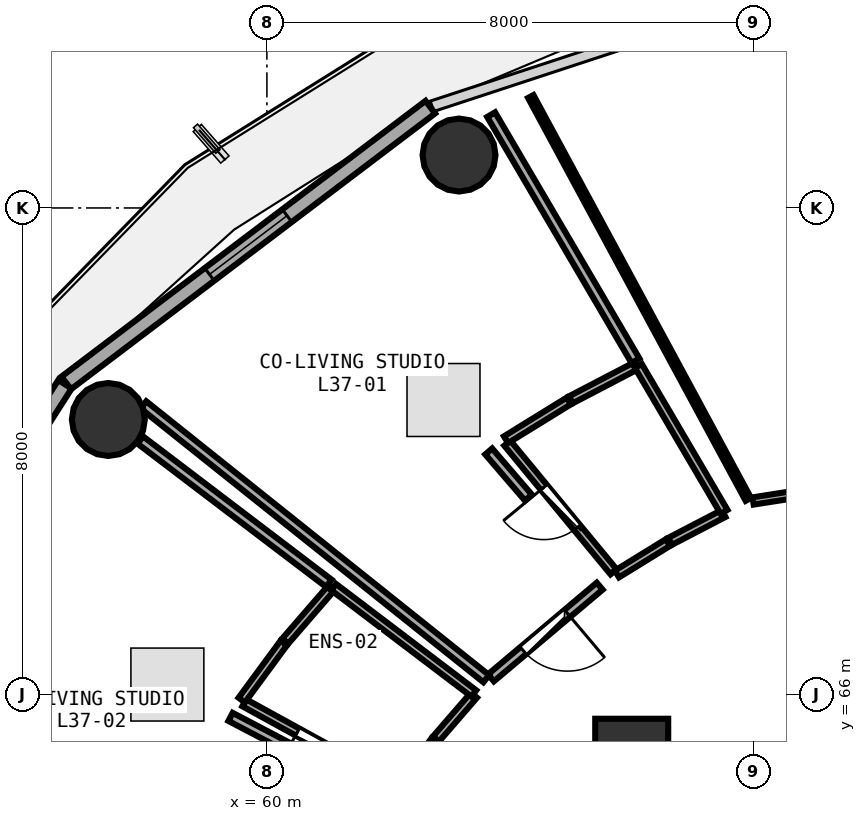
"""IFC4 building model, lengths in metres.
Left out: names, types, materials, properties, quantities, classifications, styles, units other than length and angle.
Written with IfcOpenShell. Run it as: python <this file> out.ifc"""

import sys

from ifc_helpers import new_model, si_unit, direction, frame, frame_2d, origin, origin_2d, place, context, subcontext, project, spatial, rectangle, circle, extrude, element, fill, save


model = new_model("IFC4")
c1 = context("Model", 3, precision=1e-05, world=origin(), true_north=direction((0.0, 1.0)))
c2 = subcontext(c1, "Body", "Model", "MODEL_VIEW")
j1 = project(units=[si_unit("LENGTHUNIT", "METRE"), si_unit("PLANEANGLEUNIT", "RADIAN")], contexts=[c1])
p1 = place(None, origin())
s1 = spatial("IfcSite", under=j1, at=p1, CompositionType="ELEMENT")
p2 = place(p1, origin())
s2 = spatial("IfcBuilding", under=s1, at=p2, CompositionType="ELEMENT")
p3 = place(p2, frame((0.0, 0.0, 146.85)))
s3 = spatial("IfcBuildingStorey", under=s2, at=p3, CompositionType="ELEMENT", Elevation=146.85)
p4 = place(p3, frame((66.0, 65.0, 0.0), z_axis=(0.0, 0.0, 1.0), x_axis=(1.0, 0.0, 0.0)))
e1 = element("IfcColumn", 1, at=p4, inside=s3, PredefinedType="PILASTER", context=c2, shape_type="SweptSolid", body=[
    extrude(rectangle(XDim=1.2, YDim=1.2, at=origin_2d()), origin(), (0.0, 0.0, 1.0), 3.75),
])
for number, where, z_axis, x_axis in (
    (2, (63.16, 74.87, 0.0), (0.0, 0.0, 1.0), (1.0, 0.0, 0.0)),
    (3, (57.392, 70.521, 0.0), (0.0, 0.0, 1.0), (1.0, 0.0, 0.0)),
):
    element("IfcColumn", number, at=place(p3, frame(where, z_axis=z_axis, x_axis=x_axis)), inside=s3, PredefinedType="COLUMN", context=c2, shape_type="SweptSolid", body=[
        extrude(circle(Radius=0.6, at=origin_2d()), origin(), (0.0, 0.0, 1.0), 3.75),
    ])
p5 = place(p3, frame((62.688, 75.658, 0.0), z_axis=(0.0, 0.0, 1.0), x_axis=(-0.797163719609, -0.603763202042, 0.0)))
e4 = element("IfcWall", 4, at=p5, inside=s3, PredefinedType="SOLIDWALL", context=c2, shape_type="SweptSolid", body=[
    extrude(rectangle(XDim=7.512, YDim=0.26, at=frame_2d((3.756, 0.0))), origin(), (0.0, 0.0, 1.0), 3.475),
])
p6 = place(p5, frame((2.956, 0.0, 0.85)))
e5 = element("IfcOpeningElement", 5, at=p6, cuts=e4, PredefinedType="OPENING", context=c2, shape_type="SweptSolid", body=[
    extrude(rectangle(XDim=1.6, YDim=1.45, at=frame_2d((0.8, 0.725))), frame((0.0, 0.14, 0.0), z_axis=(0.0, -1.0, 0.0), x_axis=(1.0, 0.0, 0.0)), (0.0, 0.0, 1.0), 0.28),
])
p7 = place(p3, frame((56.679, 71.1, 0.0), z_axis=(0.0, 0.0, 1.0), x_axis=(-0.538801521808, -0.842432739213, 0.0)))
e6 = element("IfcWall", 6, at=p7, inside=s3, PredefinedType="SOLIDWALL", context=c2, shape_type="SweptSolid", body=[
    extrude(rectangle(XDim=7.253, YDim=0.26, at=frame_2d((3.627, 0.0))), origin(), (0.0, 0.0, 1.0), 3.475),
])
p8 = place(p7, frame((3.152, 0.0, 0.0)))
e7 = element("IfcOpeningElement", 7, at=p8, cuts=e6, PredefinedType="OPENING", context=c2, shape_type="SweptSolid", body=[
    extrude(rectangle(XDim=0.95, YDim=2.1, at=frame_2d((0.475, 1.05))), frame((0.0, 0.14, 0.0), z_axis=(0.0, -1.0, 0.0), x_axis=(1.0, 0.0, 0.0)), (0.0, 0.0, 1.0), 0.28),
])
p9 = place(p7, frame((4.452, 0.0, 0.85)))
e8 = element("IfcOpeningElement", 8, at=p9, cuts=e6, PredefinedType="OPENING", context=c2, shape_type="SweptSolid", body=[
    extrude(rectangle(XDim=1.2, YDim=1.45, at=frame_2d((0.6, 0.725))), frame((0.0, 0.14, 0.0), z_axis=(0.0, -1.0, 0.0), x_axis=(1.0, 0.0, 0.0)), (0.0, 0.0, 1.0), 0.28),
])
p10 = place(p3, frame((75.447, 70.347, 0.0), z_axis=(0.0, 0.0, 1.0), x_axis=(-0.987988721118, -0.154526007337, 0.0)))
e9 = element("IfcWall", 9, at=p10, inside=s3, PredefinedType="PARTITIONING", context=c2, shape_type="SweptSolid", body=[
    extrude(rectangle(XDim=7.541, YDim=0.12, at=frame_2d((3.771, 0.0))), origin(), (0.0, 0.0, 1.0), 2.975),
])
p11 = place(p10, frame((3.32, 0.0, 0.0)))
e10 = element("IfcOpeningElement", 10, at=p11, cuts=e9, PredefinedType="OPENING", context=c2, shape_type="SweptSolid", body=[
    extrude(rectangle(XDim=0.9, YDim=2.08, at=frame_2d((0.45, 1.04))), frame((0.0, 0.07, 0.0), z_axis=(0.0, -1.0, 0.0), x_axis=(1.0, 0.0, 0.0)), (0.0, 0.0, 1.0), 0.14),
])
p12 = place(p3, frame((65.702, 68.016, 0.0), z_axis=(0.0, 0.0, 1.0), x_axis=(-0.636757315483, 0.771064278241, 0.0)))
e11 = element("IfcWall", 11, at=p12, inside=s3, PredefinedType="PLUMBINGWALL", context=c2, shape_type="SweptSolid", body=[
    extrude(rectangle(XDim=2.745, YDim=0.13, at=frame_2d((1.373, 0.0))), origin(), (0.0, 0.0, 1.0), 2.975),
])
p13 = place(p12, frame((0.942, 0.0, 0.0)))
e12 = element("IfcOpeningElement", 12, at=p13, cuts=e11, PredefinedType="OPENING", context=c2, shape_type="SweptSolid", body=[
    extrude(rectangle(XDim=0.86, YDim=2.05, at=frame_2d((0.43, 1.025))), frame((0.0, 0.075, 0.0), z_axis=(0.0, -1.0, 0.0), x_axis=(1.0, 0.0, 0.0)), (0.0, 0.0, 1.0), 0.15),
])
p14 = place(p3, frame((65.473, 67.78, 0.0), z_axis=(0.0, 0.0, 1.0), x_axis=(-0.764572750514, -0.644537438146, 0.0)))
e13 = element("IfcWall", 13, at=p14, inside=s3, PredefinedType="PARTITIONING", context=c2, shape_type="SweptSolid", body=[
    extrude(rectangle(XDim=2.339, YDim=0.15, at=frame_2d((1.169, 0.0))), origin(), (0.0, 0.0, 1.0), 2.975),
])
p15 = place(p14, frame((0.694, 0.0, 0.0)))
e14 = element("IfcOpeningElement", 14, at=p15, cuts=e13, PredefinedType="OPENING", context=c2, shape_type="SweptSolid", body=[
    extrude(rectangle(XDim=0.95, YDim=2.08, at=frame_2d((0.475, 1.04))), frame((0.0, 0.085, 0.0), z_axis=(0.0, -1.0, 0.0), x_axis=(1.0, 0.0, 0.0)), (0.0, 0.0, 1.0), 0.17),
])
p16 = place(p3, frame((62.131, 64.489, 0.0), z_axis=(0.0, 0.0, 1.0), x_axis=(-0.87680194327, 0.480851694681, 0.0)))
e15 = element("IfcWall", 15, at=p16, inside=s3, PredefinedType="PLUMBINGWALL", context=c2, shape_type="SweptSolid", body=[
    extrude(rectangle(XDim=2.855, YDim=0.13, at=frame_2d((1.428, 0.0))), origin(), (0.0, 0.0, 1.0), 2.975),
])
p17 = place(p16, frame((0.998, 0.0, 0.0)))
e16 = element("IfcOpeningElement", 16, at=p17, cuts=e15, PredefinedType="OPENING", context=c2, shape_type="SweptSolid", body=[
    extrude(rectangle(XDim=0.86, YDim=2.05, at=frame_2d((0.43, 1.025))), frame((0.0, 0.075, 0.0), z_axis=(0.0, -1.0, 0.0), x_axis=(1.0, 0.0, 0.0)), (0.0, 0.0, 1.0), 0.15),
])
p18 = place(p3, frame((67.918, 69.207, 0.0), z_axis=(0.0, 0.0, 1.0), x_axis=(-0.475160964166, 0.879898890858, 0.0)))
e17 = element("IfcWall", 17, at=p18, inside=s3, PredefinedType="PARTITIONING", context=c2, shape_type="SweptSolid", body=[
    extrude(rectangle(XDim=7.53, YDim=0.1, at=frame_2d((3.765, 0.0))), origin(), (0.0, 0.0, 1.0), 3.025),
])
p19 = place(p3, frame((67.511, 68.976, 0.0), z_axis=(0.0, 0.0, 1.0), x_axis=(-0.88687840459, -0.462002917168, 0.0)))
e18 = element("IfcWall", 18, at=p19, inside=s3, PredefinedType="PLUMBINGWALL", context=c2, shape_type="SweptSolid", body=[
    extrude(rectangle(XDim=0.993, YDim=0.13, at=frame_2d((0.497, 0.0))), origin(), (0.0, 0.0, 1.0), 3.235),
])
p20 = place(p3, frame((66.596, 68.498, 0.0), z_axis=(0.0, 0.0, 1.0), x_axis=(-0.851266784219, -0.52473313416, 0.0)))
e19 = element("IfcWall", 19, at=p20, inside=s3, PredefinedType="PLUMBINGWALL", context=c2, shape_type="SweptSolid", body=[
    extrude(rectangle(XDim=0.985, YDim=0.13, at=frame_2d((0.493, 0.0))), origin(), (0.0, 0.0, 1.0), 3.48),
])
p21 = place(p3, frame((63.933, 70.189, 0.0), z_axis=(0.0, 0.0, 1.0), x_axis=(0.851319302067, 0.524647925688, 0.0)))
e20 = element("IfcWall", 20, at=p21, inside=s3, PredefinedType="PLUMBINGWALL", context=c2, shape_type="SweptSolid", body=[
    extrude(rectangle(XDim=1.212, YDim=0.13, at=frame_2d((0.606, 0.0))), origin(), (0.0, 0.0, 1.0), 2.975),
])
p22 = place(p3, frame((65.0, 70.845, 0.0), z_axis=(0.0, 0.0, 1.0), x_axis=(0.886527747476, 0.462675429383, 0.0)))
e21 = element("IfcWall", 21, at=p22, inside=s3, PredefinedType="PLUMBINGWALL", context=c2, shape_type="SweptSolid", body=[
    extrude(rectangle(XDim=1.22, YDim=0.13, at=frame_2d((0.61, 0.0))), origin(), (0.0, 0.0, 1.0), 3.175),
])
p23 = place(p3, frame((66.109, 71.402, 0.0), z_axis=(0.0, 0.0, 1.0), x_axis=(0.506513995599, -0.862231739304, 0.0)))
e22 = element("IfcWall", 22, at=p23, inside=s3, PredefinedType="PLUMBINGWALL", context=c2, shape_type="SweptSolid", body=[
    extrude(rectangle(XDim=2.783, YDim=0.13, at=frame_2d((1.392, 0.0))), origin(), (0.0, 0.0, 1.0), 3.175),
])
p24 = place(p3, frame((63.608, 66.259, 0.0), z_axis=(0.0, 0.0, 1.0), x_axis=(-0.781429667655, 0.623993328898, 0.0)))
e23 = element("IfcWall", 23, at=p24, inside=s3, PredefinedType="PARTITIONING", context=c2, shape_type="SweptSolid", body=[
    extrude(rectangle(XDim=7.216, YDim=0.15, at=frame_2d((3.608, 0.0))), origin(), (0.0, 0.0, 1.0), 2.975),
])
p25 = place(p3, frame((63.688, 75.534, 0.0), z_axis=(0.0, 0.0, 1.0), x_axis=(0.505850409321, -0.862621216636, 0.0)))
e24 = element("IfcWall", 24, at=p25, inside=s3, PredefinedType="PARTITIONING", context=c2, shape_type="SweptSolid", body=[
    extrude(rectangle(XDim=4.69, YDim=0.15, at=frame_2d((2.345, 0.0))), origin(), (0.0, 0.0, 1.0), 3.025),
])
p26 = place(p3, frame((63.648, 69.996, 0.0), z_axis=(0.0, 0.0, 1.0), x_axis=(0.651733897109, -0.758447709047, 0.0)))
e25 = element("IfcWall", 25, at=p26, inside=s3, PredefinedType="PARTITIONING", context=c2, shape_type="SweptSolid", body=[
    extrude(rectangle(XDim=1.002, YDim=0.15, at=frame_2d((0.501, 0.0))), origin(), (0.0, 0.0, 1.0), 3.48),
])
p27 = place(p3, frame((63.406, 65.989, 0.0), z_axis=(0.0, 0.0, 1.0), x_axis=(-0.654452758924, -0.756102894015, 0.0)))
e26 = element("IfcWall", 26, at=p27, inside=s3, PredefinedType="PLUMBINGWALL", context=c2, shape_type="SweptSolid", body=[
    extrude(rectangle(XDim=0.954, YDim=0.13, at=frame_2d((0.477, 0.0))), origin(), (0.0, 0.0, 1.0), 3.48),
])
p28 = place(p3, frame((62.757, 65.237, 0.0), z_axis=(0.0, 0.0, 1.0), x_axis=(-0.593701036402, -0.804685702231, 0.0)))
e27 = element("IfcWall", 27, at=p28, inside=s3, PredefinedType="PLUMBINGWALL", context=c2, shape_type="SweptSolid", body=[
    extrude(rectangle(XDim=0.945, YDim=0.13, at=frame_2d((0.473, 0.0))), origin(), (0.0, 0.0, 1.0), 2.975),
])
p29 = place(p3, frame((59.587, 65.907, 0.0), z_axis=(0.0, 0.0, 1.0), x_axis=(0.592518663081, 0.805556722956, 0.0)))
e28 = element("IfcWall", 28, at=p29, inside=s3, PredefinedType="PLUMBINGWALL", context=c2, shape_type="SweptSolid", body=[
    extrude(rectangle(XDim=1.163, YDim=0.13, at=frame_2d((0.582, 0.0))), origin(), (0.0, 0.0, 1.0), 3.48),
])
p30 = place(p3, frame((60.301, 66.875, 0.0), z_axis=(0.0, 0.0, 1.0), x_axis=(0.654502595292, 0.756059754752, 0.0)))
e29 = element("IfcWall", 29, at=p30, inside=s3, PredefinedType="PLUMBINGWALL", context=c2, shape_type="SweptSolid", body=[
    extrude(rectangle(XDim=1.173, YDim=0.13, at=frame_2d((0.586, 0.0))), origin(), (0.0, 0.0, 1.0), 3.48),
])
p31 = place(p3, frame((61.098, 67.765, 0.0), z_axis=(0.0, 0.0, 1.0), x_axis=(0.796687067956, -0.604392021581, 0.0)))
e30 = element("IfcWall", 30, at=p31, inside=s3, PredefinedType="PLUMBINGWALL", context=c2, shape_type="SweptSolid", body=[
    extrude(rectangle(XDim=2.894, YDim=0.13, at=frame_2d((1.447, 0.0))), origin(), (0.0, 0.0, 1.0), 3.235),
])
p32 = place(p3, frame((57.918, 70.184, 0.0), z_axis=(0.0, 0.0, 1.0), x_axis=(0.796177895966, -0.605062606657, 0.0)))
e31 = element("IfcWall", 31, at=p32, inside=s3, PredefinedType="PARTITIONING", context=c2, shape_type="SweptSolid", body=[
    extrude(rectangle(XDim=3.895, YDim=0.15, at=frame_2d((1.948, 0.0))), origin(), (0.0, 0.0, 1.0), 2.975),
])
p33 = place(p3, frame((59.402, 65.63, 0.0), z_axis=(0.0, 0.0, 1.0), x_axis=(0.885450338388, -0.46473400806, 0.0)))
e32 = element("IfcWall", 32, at=p33, inside=s3, PredefinedType="PARTITIONING", context=c2, shape_type="SweptSolid", body=[
    extrude(rectangle(XDim=1.054, YDim=0.15, at=frame_2d((0.527, 0.0))), origin(), (0.0, 0.0, 1.0), 3.48),
])
p34 = place(p6, origin())
e33 = element("IfcWindow", 33, at=p34, inside=s3, PartitioningType="SINGLE_PANEL", PredefinedType="WINDOW", context=c2, shape_type="SweptSolid", body=[
    extrude(rectangle(XDim=1.6, YDim=1.45, at=frame_2d((0.8, 0.725))), frame((0.0, 0.03, 0.0), z_axis=(0.0, -1.0, 0.0), x_axis=(1.0, 0.0, 0.0)), (0.0, 0.0, 1.0), 0.06),
])
fill(e5, e33)
p35 = place(p13, origin())
e34 = element("IfcDoor", 34, at=p35, inside=s3, OperationType="SINGLE_SWING_RIGHT", PredefinedType="DOOR", context=c2, shape_type="SweptSolid", body=[
    extrude(rectangle(XDim=0.86, YDim=2.05, at=frame_2d((0.43, 1.025))), frame((0.0, 0.025, 0.0), z_axis=(0.0, -1.0, 0.0), x_axis=(1.0, 0.0, 0.0)), (0.0, 0.0, 1.0), 0.05),
])
fill(e12, e34)
p36 = place(p15, origin())
e35 = element("IfcDoor", 35, at=p36, inside=s3, OperationType="SINGLE_SWING_LEFT", PredefinedType="DOOR", context=c2, shape_type="SweptSolid", body=[
    extrude(rectangle(XDim=0.95, YDim=2.08, at=frame_2d((0.475, 1.04))), frame((0.0, 0.025, 0.0), z_axis=(0.0, -1.0, 0.0), x_axis=(1.0, 0.0, 0.0)), (0.0, 0.0, 1.0), 0.05),
])
fill(e14, e35)
p37 = place(p17, origin())
e36 = element("IfcDoor", 36, at=p37, inside=s3, OperationType="SINGLE_SWING_RIGHT", PredefinedType="DOOR", context=c2, shape_type="SweptSolid", body=[
    extrude(rectangle(XDim=0.86, YDim=2.05, at=frame_2d((0.43, 1.025))), frame((0.0, 0.025, 0.0), z_axis=(0.0, -1.0, 0.0), x_axis=(1.0, 0.0, 0.0)), (0.0, 0.0, 1.0), 0.05),
])
fill(e16, e36)
save(model, sys.argv[1])
